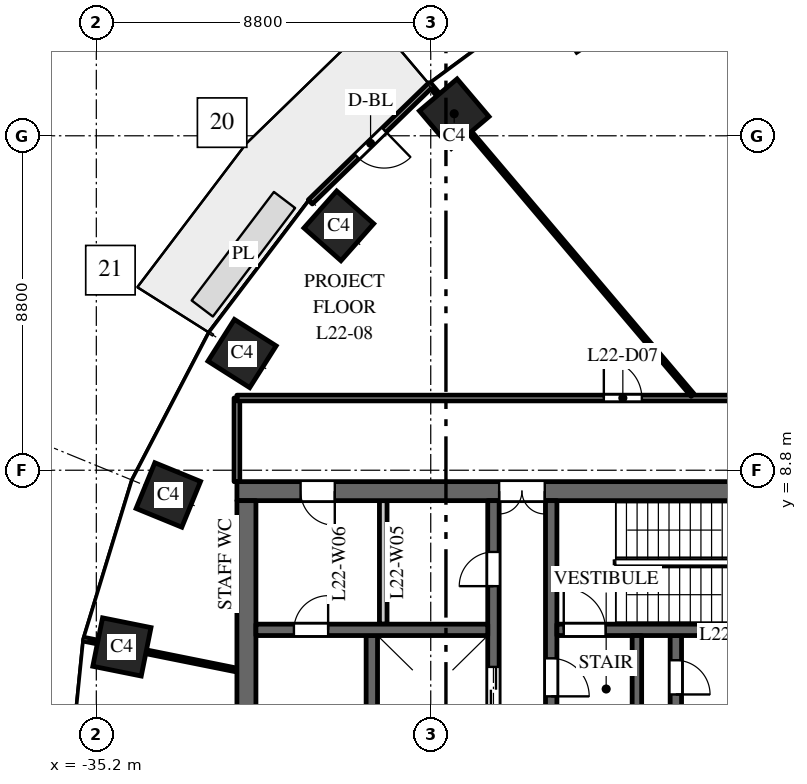
"""IFC4 building model, lengths in metres.
Left out: names, types, materials, properties, quantities, classifications, styles, units other than length and angle.
Written with IfcOpenShell. Run it as: python <this file> out.ifc"""

import sys

from ifc_helpers import new_model, si_unit, direction, frame, frame_2d, origin, origin_2d, place, context, subcontext, project, spatial, rectangle, extrude, element, fill, save


model = new_model("IFC4")
c1 = context("Model", 3, precision=1e-05, world=origin(), true_north=direction((0.0, 1.0)))
c2 = subcontext(c1, "Body", "Model", "MODEL_VIEW")
j1 = project(units=[si_unit("LENGTHUNIT", "METRE"), si_unit("PLANEANGLEUNIT", "RADIAN")], contexts=[c1])
p1 = place(None, origin())
s1 = spatial("IfcSite", under=j1, at=p1, CompositionType="ELEMENT")
p2 = place(p1, origin())
s2 = spatial("IfcBuilding", under=s1, at=p2, CompositionType="ELEMENT")
p3 = place(p2, frame((0.0, 0.0, 100.0)))
s3 = spatial("IfcBuildingStorey", under=s2, at=p3, CompositionType="ELEMENT", Elevation=100.0)
for number, where, z_axis, x_axis in (
    (1, (-25.783, 18.18, 0.0), (0.0, 0.0, 1.0), (-0.763, -0.646, 0.0)),
    (2, (-28.819, 15.23, 0.0), (0.0, 0.0, 1.0), (-0.663, -0.749, 0.0)),
    (3, (-31.365, 11.871, 0.0), (0.0, 0.0, 1.0), (-0.535, -0.845, 0.0)),
    (4, (-33.305, 8.149, 0.0), (0.0, 0.0, 1.0), (-0.379, -0.925, 0.0)),
    (5, (-34.527, 4.151, 0.0), (0.0, 0.0, 1.0), (-0.197, -0.98, 0.0)),
):
    element("IfcColumn", number, at=place(p3, frame(where, z_axis=z_axis, x_axis=x_axis)), inside=s3, PredefinedType="COLUMN", context=c2, shape_type="SweptSolid", body=[
        extrude(rectangle(XDim=1.3, YDim=1.3, at=origin_2d()), origin(), (0.0, 0.0, 1.0), 4.0),
    ])
p4 = place(p3, frame((-16.5, 8.25, 0.0), z_axis=(0.0, 0.0, 1.0), x_axis=(-1.0, 0.0, 0.0)))
e6 = element("IfcWall", 6, at=p4, inside=s3, PredefinedType="SHEAR", context=c2, shape_type="SweptSolid", body=[
    extrude(rectangle(XDim=15.0, YDim=0.5, at=frame_2d((7.5, 0.0))), origin(), (0.0, 0.0, 1.0), 3.7),
])
p5 = place(p4, frame((6.9, 0.0, 0.0)))
e7 = element("IfcOpeningElement", 7, at=p5, cuts=e6, PredefinedType="OPENING", context=c2, shape_type="SweptSolid", body=[
    extrude(rectangle(XDim=1.2, YDim=2.1, at=frame_2d((0.6, 1.05))), frame((0.0, 0.26, 0.0), z_axis=(0.0, -1.0, 0.0), x_axis=(1.0, 0.0, 0.0)), (0.0, 0.0, 1.0), 0.52),
])
p6 = place(p4, frame((12.425, 0.0, 0.0)))
e8 = element("IfcOpeningElement", 8, at=p6, cuts=e6, PredefinedType="OPENING", context=c2, shape_type="SweptSolid", body=[
    extrude(rectangle(XDim=0.9, YDim=2.1, at=frame_2d((0.45, 1.05))), frame((0.0, 0.26, 0.0), z_axis=(0.0, -1.0, 0.0), x_axis=(1.0, 0.0, 0.0)), (0.0, 0.0, 1.0), 0.52),
])
p7 = place(p3, frame((-27.95, -4.45, 0.0), z_axis=(0.0, 0.0, 1.0), x_axis=(0.0, 1.0, 0.0)))
e9 = element("IfcWall", 9, at=p7, inside=s3, PredefinedType="SHEAR", context=c2, shape_type="SweptSolid", body=[
    extrude(rectangle(XDim=8.9, YDim=0.3, at=frame_2d((4.45, 0.0))), origin(), (0.0, 0.0, 1.0), 3.7),
])
p8 = place(p3, frame((-19.95, -4.45, 0.0), z_axis=(0.0, 0.0, 1.0), x_axis=(0.0, 1.0, 0.0)))
e10 = element("IfcWall", 10, at=p8, inside=s3, PredefinedType="SHEAR", context=c2, shape_type="SweptSolid", body=[
    extrude(rectangle(XDim=8.9, YDim=0.3, at=frame_2d((4.45, 0.0))), origin(), (0.0, 0.0, 1.0), 3.7),
])
p9 = place(p8, frame((0.775, 0.0, 0.0)))
e11 = element("IfcOpeningElement", 11, at=p9, cuts=e10, PredefinedType="OPENING", context=c2, shape_type="SweptSolid", body=[
    extrude(rectangle(XDim=1.2, YDim=2.1, at=frame_2d((0.6, 1.05))), frame((0.0, 0.16, 0.0), z_axis=(0.0, -1.0, 0.0), x_axis=(1.0, 0.0, 0.0)), (0.0, 0.0, 1.0), 0.32),
])
p10 = place(p8, frame((7.35, 0.0, 0.0)))
e12 = element("IfcOpeningElement", 12, at=p10, cuts=e10, PredefinedType="OPENING", context=c2, shape_type="SweptSolid", body=[
    extrude(rectangle(XDim=0.9, YDim=2.1, at=frame_2d((0.45, 1.05))), frame((0.0, 0.16, 0.0), z_axis=(0.0, -1.0, 0.0), x_axis=(1.0, 0.0, 0.0)), (0.0, 0.0, 1.0), 0.32),
])
p11 = place(p3, frame((-24.75, -8.0, 0.0), z_axis=(0.0, 0.0, 1.0), x_axis=(0.0, 1.0, 0.0)))
e13 = element("IfcWall", 13, at=p11, inside=s3, PredefinedType="SHEAR", context=c2, shape_type="SweptSolid", body=[
    extrude(rectangle(XDim=16.0, YDim=0.3, at=frame_2d((8.0, 0.0))), origin(), (0.0, 0.0, 1.0), 3.7),
])
p12 = place(p11, frame((4.425, 0.0, 0.0)))
e14 = element("IfcOpeningElement", 14, at=p12, cuts=e13, PredefinedType="OPENING", context=c2, shape_type="SweptSolid", body=[
    extrude(rectangle(XDim=1.1, YDim=2.1, at=frame_2d((0.55, 1.05))), frame((0.0, 0.16, 0.0), z_axis=(0.0, -1.0, 0.0), x_axis=(1.0, 0.0, 0.0)), (0.0, 0.0, 1.0), 0.32),
])
p13 = place(p11, frame((7.45, 0.0, 0.0)))
e15 = element("IfcOpeningElement", 15, at=p13, cuts=e13, PredefinedType="OPENING", context=c2, shape_type="SweptSolid", body=[
    extrude(rectangle(XDim=1.1, YDim=2.1, at=frame_2d((0.55, 1.05))), frame((0.0, 0.16, 0.0), z_axis=(0.0, -1.0, 0.0), x_axis=(1.0, 0.0, 0.0)), (0.0, 0.0, 1.0), 0.32),
])
p14 = place(p11, frame((10.425, 0.0, 0.0)))
e16 = element("IfcOpeningElement", 16, at=p14, cuts=e13, PredefinedType="OPENING", context=c2, shape_type="SweptSolid", body=[
    extrude(rectangle(XDim=1.2, YDim=2.1, at=frame_2d((0.6, 1.05))), frame((0.0, 0.16, 0.0), z_axis=(0.0, -1.0, 0.0), x_axis=(1.0, 0.0, 0.0)), (0.0, 0.0, 1.0), 0.32),
])
p15 = place(p11, frame((13.75, 0.0, 0.0)))
e17 = element("IfcOpeningElement", 17, at=p15, cuts=e13, PredefinedType="OPENING", context=c2, shape_type="SweptSolid", body=[
    extrude(rectangle(XDim=0.9, YDim=2.1, at=frame_2d((0.45, 1.05))), frame((0.0, 0.16, 0.0), z_axis=(0.0, -1.0, 0.0), x_axis=(1.0, 0.0, 0.0)), (0.0, 0.0, 1.0), 0.32),
])
p16 = place(p11, frame((1.975, 0.0, 0.0)))
e18 = element("IfcOpeningElement", 18, at=p16, cuts=e13, PredefinedType="OPENING", context=c2, shape_type="SweptSolid", body=[
    extrude(rectangle(XDim=0.9, YDim=2.1, at=frame_2d((0.45, 1.05))), frame((0.0, 0.16, 0.0), z_axis=(0.0, -1.0, 0.0), x_axis=(1.0, 0.0, 0.0)), (0.0, 0.0, 1.0), 0.32),
])
p17 = place(p11, frame((0.35, 0.0, 0.0)))
e19 = element("IfcOpeningElement", 19, at=p17, cuts=e13, PredefinedType="OPENING", context=c2, shape_type="SweptSolid", body=[
    extrude(rectangle(XDim=0.9, YDim=2.1, at=frame_2d((0.45, 1.05))), frame((0.0, 0.16, 0.0), z_axis=(0.0, -1.0, 0.0), x_axis=(1.0, 0.0, 0.0)), (0.0, 0.0, 1.0), 0.32),
])
p18 = place(p3, frame((-31.25, -8.0, 0.0), z_axis=(0.0, 0.0, 1.0), x_axis=(0.0, 1.0, 0.0)))
e20 = element("IfcWall", 20, at=p18, inside=s3, PredefinedType="SHEAR", context=c2, shape_type="SweptSolid", body=[
    extrude(rectangle(XDim=16.0, YDim=0.5, at=frame_2d((8.0, 0.0))), origin(), (0.0, 0.0, 1.0), 3.7),
])
p19 = place(p3, frame((-24.9, 4.6, 0.0), z_axis=(0.0, 0.0, 1.0), x_axis=(-1.0, 0.0, 0.0)))
e21 = element("IfcWall", 21, at=p19, inside=s3, PredefinedType="SHEAR", context=c2, shape_type="SweptSolid", body=[
    extrude(rectangle(XDim=6.1, YDim=0.3, at=frame_2d((3.05, 0.0))), origin(), (0.0, 0.0, 1.0), 3.7),
])
p20 = place(p19, frame((4.2, 0.0, 0.0)))
e22 = element("IfcOpeningElement", 22, at=p20, cuts=e21, PredefinedType="OPENING", context=c2, shape_type="SweptSolid", body=[
    extrude(rectangle(XDim=0.9, YDim=2.1, at=frame_2d((0.45, 1.05))), frame((0.0, 0.16, 0.0), z_axis=(0.0, -1.0, 0.0), x_axis=(1.0, 0.0, 0.0)), (0.0, 0.0, 1.0), 0.32),
])
p21 = place(p3, frame((-27.65, 4.75, 0.0), z_axis=(0.0, 0.0, 1.0), x_axis=(0.0, 1.0, 0.0)))
e23 = element("IfcWall", 23, at=p21, inside=s3, PredefinedType="PARTITIONING", context=c2, shape_type="SweptSolid", body=[
    extrude(rectangle(XDim=3.25, YDim=0.2, at=frame_2d((1.625, 0.0))), origin(), (0.0, 0.0, 1.0), 3.7),
])
p22 = place(p3, frame((-23.23, 2.25, 0.0), z_axis=(0.0, 0.0, 1.0), x_axis=(0.0, 1.0, 0.0)))
e24 = element("IfcWall", 24, at=p22, inside=s3, PredefinedType="SHEAR", context=c2, shape_type="SweptSolid", body=[
    extrude(rectangle(XDim=5.75, YDim=0.3, at=frame_2d((2.875, 0.0))), origin(), (0.0, 0.0, 1.0), 3.7),
])
p23 = place(p22, frame((0.6, 0.0, 0.0)))
e25 = element("IfcOpeningElement", 25, at=p23, cuts=e24, PredefinedType="OPENING", context=c2, shape_type="SweptSolid", body=[
    extrude(rectangle(XDim=1.0, YDim=2.1, at=frame_2d((0.5, 1.05))), frame((0.0, 0.16, 0.0), z_axis=(0.0, -1.0, 0.0), x_axis=(1.0, 0.0, 0.0)), (0.0, 0.0, 1.0), 0.32),
])
p24 = place(p3, frame((-16.9, 4.6, 0.0), z_axis=(0.0, 0.0, 1.0), x_axis=(-1.0, 0.0, 0.0)))
e26 = element("IfcWall", 26, at=p24, inside=s3, PredefinedType="SHEAR", context=c2, shape_type="SweptSolid", body=[
    extrude(rectangle(XDim=6.18, YDim=0.3, at=frame_2d((3.09, 0.0))), origin(), (0.0, 0.0, 1.0), 3.7),
])
p25 = place(p24, frame((4.9, 0.0, 0.0)))
e27 = element("IfcOpeningElement", 27, at=p25, cuts=e26, PredefinedType="OPENING", context=c2, shape_type="SweptSolid", body=[
    extrude(rectangle(XDim=1.1, YDim=2.1, at=frame_2d((0.55, 1.05))), frame((0.0, 0.16, 0.0), z_axis=(0.0, -1.0, 0.0), x_axis=(1.0, 0.0, 0.0)), (0.0, 0.0, 1.0), 0.32),
])
p26 = place(p3, frame((-20.975, 2.25, 0.0), z_axis=(0.0, 0.0, 1.0), x_axis=(0.0, 1.0, 0.0)))
e28 = element("IfcWall", 28, at=p26, inside=s3, PredefinedType="SHEAR", context=c2, shape_type="SweptSolid", body=[
    extrude(rectangle(XDim=2.2, YDim=0.25, at=frame_2d((1.1, 0.0))), origin(), (0.0, 0.0, 1.0), 3.7),
])
p27 = place(p3, frame((-26.396, 18.943, 0.0), z_axis=(0.0, 0.0, 1.0), x_axis=(-0.717214761864, -0.696852197647, 0.0)))
e29 = element("IfcWall", 29, at=p27, inside=s3, PredefinedType="STANDARD", context=c2, shape_type="SweptSolid", body=[
    extrude(rectangle(XDim=4.424, YDim=0.15, at=frame_2d((2.212, 0.0))), origin(), (0.0, 0.0, 1.0), 3.7),
])
p28 = place(p27, frame((1.712, 0.0, 0.0)))
e30 = element("IfcOpeningElement", 30, at=p28, cuts=e29, PredefinedType="OPENING", context=c2, shape_type="SweptSolid", body=[
    extrude(rectangle(XDim=1.0, YDim=2.4, at=frame_2d((0.5, 1.2))), frame((0.0, 0.085, 0.0), z_axis=(0.0, -1.0, 0.0), x_axis=(1.0, 0.0, 0.0)), (0.0, 0.0, 1.0), 0.17),
])
p29 = place(p3, frame((-35.512, 4.349, 0.0), z_axis=(0.0, 0.0, 1.0), x_axis=(0.980357474535, -0.197228857227, 0.0)))
e31 = element("IfcWall", 31, at=p29, inside=s3, PredefinedType="PARTITIONING", context=c2, shape_type="SweptSolid", body=[
    extrude(rectangle(XDim=4.092, YDim=0.1, at=frame_2d((2.046, 0.0))), origin(), (0.0, 0.0, 1.0), 3.2),
])
p30 = place(p3, frame((-31.5, 8.5, 0.0), z_axis=(0.0, 0.0, 1.0), x_axis=(0.0, 1.0, 0.0)))
e32 = element("IfcWall", 32, at=p30, inside=s3, PredefinedType="PARTITIONING", context=c2, shape_type="SweptSolid", body=[
    extrude(rectangle(XDim=2.2, YDim=0.15, at=frame_2d((1.1, 0.0))), origin(), (0.0, 0.0, 1.0), 3.7),
])
p31 = place(p3, frame((-31.5, 10.7, 0.0), z_axis=(0.0, 0.0, 1.0), x_axis=(1.0, 0.0, 0.0)))
e33 = element("IfcWall", 33, at=p31, inside=s3, PredefinedType="PARTITIONING", context=c2, shape_type="SweptSolid", body=[
    extrude(rectangle(XDim=15.0, YDim=0.15, at=frame_2d((7.5, 0.0))), origin(), (0.0, 0.0, 1.0), 3.1),
])
p32 = place(p31, frame((9.655, 0.0, 0.0)))
e34 = element("IfcOpeningElement", 34, at=p32, cuts=e33, PredefinedType="OPENING", context=c2, shape_type="SweptSolid", body=[
    extrude(rectangle(XDim=1.0, YDim=2.1, at=frame_2d((0.5, 1.05))), frame((0.0, 0.085, 0.0), z_axis=(0.0, -1.0, 0.0), x_axis=(1.0, 0.0, 0.0)), (0.0, 0.0, 1.0), 0.17),
])
p33 = place(p3, frame((-26.43, 18.945, 0.0), z_axis=(0.0, 0.0, 1.0), x_axis=(0.646400187952, -0.762998556365, 0.0)))
e35 = element("IfcWall", 35, at=p33, inside=s3, PredefinedType="PARTITIONING", context=c2, shape_type="SweptSolid", body=[
    extrude(rectangle(XDim=10.704, YDim=0.1, at=frame_2d((5.352, 0.0))), origin(), (0.0, 0.0, 1.0), 3.7),
])
p34 = place(p14, origin())
e36 = element("IfcDoor", 36, at=p34, inside=s3, OperationType="DOUBLE_DOOR_SLIDING", PredefinedType="DOOR", context=c2, shape_type="SweptSolid", body=[
    extrude(rectangle(XDim=1.2, YDim=2.1, at=frame_2d((0.6, 1.05))), frame((0.0, 0.025, 0.0), z_axis=(0.0, -1.0, 0.0), x_axis=(1.0, 0.0, 0.0)), (0.0, 0.0, 1.0), 0.05),
])
fill(e16, e36)
p35 = place(p25, origin())
e37 = element("IfcDoor", 37, at=p35, inside=s3, OperationType="SINGLE_SWING_RIGHT", PredefinedType="DOOR", context=c2, shape_type="SweptSolid", body=[
    extrude(rectangle(XDim=1.1, YDim=2.1, at=frame_2d((0.55, 1.05))), frame((0.0, 0.025, 0.0), z_axis=(0.0, -1.0, 0.0), x_axis=(1.0, 0.0, 0.0)), (0.0, 0.0, 1.0), 0.05),
])
fill(e27, e37)
p36 = place(p23, origin())
e38 = element("IfcDoor", 38, at=p36, inside=s3, OperationType="SINGLE_SWING_LEFT", PredefinedType="DOOR", context=c2, shape_type="SweptSolid", body=[
    extrude(rectangle(XDim=1.0, YDim=2.1, at=frame_2d((0.5, 1.05))), frame((0.0, 0.025, 0.0), z_axis=(0.0, -1.0, 0.0), x_axis=(1.0, 0.0, 0.0)), (0.0, 0.0, 1.0), 0.05),
])
fill(e25, e38)
p37 = place(p5, origin())
e39 = element("IfcDoor", 39, at=p37, inside=s3, OperationType="DOUBLE_DOOR_DOUBLE_SWING", PredefinedType="DOOR", context=c2, shape_type="SweptSolid", body=[
    extrude(rectangle(XDim=1.2, YDim=2.1, at=frame_2d((0.6, 1.05))), frame((0.0, 0.025, 0.0), z_axis=(0.0, -1.0, 0.0), x_axis=(1.0, 0.0, 0.0)), (0.0, 0.0, 1.0), 0.05),
])
fill(e7, e39)
p38 = place(p10, origin())
e40 = element("IfcDoor", 40, at=p38, inside=s3, OperationType="SINGLE_SWING_LEFT", PredefinedType="DOOR", context=c2, shape_type="SweptSolid", body=[
    extrude(rectangle(XDim=0.9, YDim=2.1, at=frame_2d((0.45, 1.05))), frame((0.0, 0.025, 0.0), z_axis=(0.0, -1.0, 0.0), x_axis=(1.0, 0.0, 0.0)), (0.0, 0.0, 1.0), 0.05),
])
fill(e12, e40)
p39 = place(p15, origin())
e41 = element("IfcDoor", 41, at=p39, inside=s3, OperationType="SINGLE_SWING_RIGHT", PredefinedType="DOOR", context=c2, shape_type="SweptSolid", body=[
    extrude(rectangle(XDim=0.9, YDim=2.1, at=frame_2d((0.45, 1.05))), frame((0.0, 0.025, 0.0), z_axis=(0.0, -1.0, 0.0), x_axis=(1.0, 0.0, 0.0)), (0.0, 0.0, 1.0), 0.05),
])
fill(e17, e41)
p40 = place(p6, origin())
e42 = element("IfcDoor", 42, at=p40, inside=s3, OperationType="SINGLE_SWING_RIGHT", PredefinedType="DOOR", context=c2, shape_type="SweptSolid", body=[
    extrude(rectangle(XDim=0.9, YDim=2.1, at=frame_2d((0.45, 1.05))), frame((0.0, 0.025, 0.0), z_axis=(0.0, -1.0, 0.0), x_axis=(1.0, 0.0, 0.0)), (0.0, 0.0, 1.0), 0.05),
])
fill(e8, e42)
p41 = place(p20, origin())
e43 = element("IfcDoor", 43, at=p41, inside=s3, OperationType="SINGLE_SWING_LEFT", PredefinedType="DOOR", context=c2, shape_type="SweptSolid", body=[
    extrude(rectangle(XDim=0.9, YDim=2.1, at=frame_2d((0.45, 1.05))), frame((0.0, 0.025, 0.0), z_axis=(0.0, -1.0, 0.0), x_axis=(1.0, 0.0, 0.0)), (0.0, 0.0, 1.0), 0.05),
])
fill(e22, e43)
p42 = place(p28, origin())
e44 = element("IfcDoor", 44, at=p42, inside=s3, OperationType="SINGLE_SWING_LEFT", PredefinedType="DOOR", context=c2, shape_type="SweptSolid", body=[
    extrude(rectangle(XDim=1.0, YDim=2.4, at=frame_2d((0.5, 1.2))), frame((0.0, 0.025, 0.0), z_axis=(0.0, -1.0, 0.0), x_axis=(1.0, 0.0, 0.0)), (0.0, 0.0, 1.0), 0.05),
])
fill(e30, e44)
p43 = place(p32, origin())
e45 = element("IfcDoor", 45, at=p43, inside=s3, OperationType="SINGLE_SWING_LEFT", PredefinedType="DOOR", context=c2, shape_type="SweptSolid", body=[
    extrude(rectangle(XDim=1.0, YDim=2.1, at=frame_2d((0.5, 1.05))), frame((0.0, 0.025, 0.0), z_axis=(0.0, -1.0, 0.0), x_axis=(1.0, 0.0, 0.0)), (0.0, 0.0, 1.0), 0.05),
])
fill(e34, e45)
save(model, sys.argv[1])
